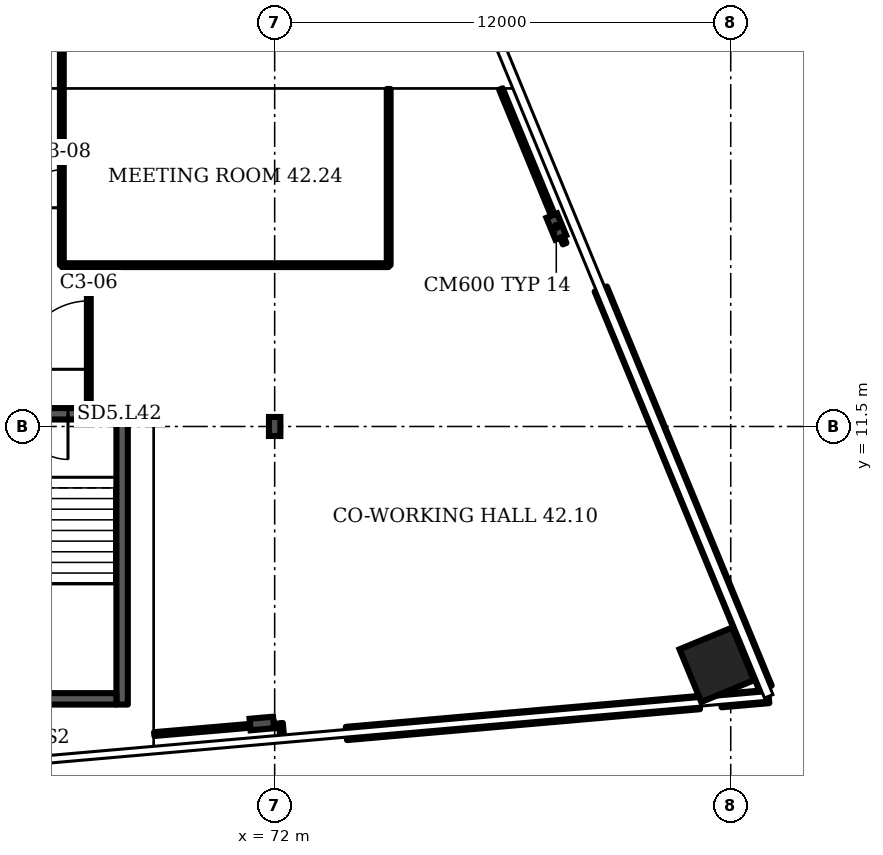
"""IFC4 building model, lengths in metres.
Left out: names, types, materials, properties, quantities, classifications, styles, units other than length and angle.
Written with IfcOpenShell. Run it as: python <this file> out.ifc"""

import sys

from ifc_helpers import new_model, si_unit, direction, frame, frame_2d, origin, origin_2d, place, context, subcontext, project, spatial, rectangle, i_section, extrude, element, fill, save


model = new_model("IFC4")
c1 = context("Model", 3, precision=1e-05, world=origin(), true_north=direction((0.0, 1.0)))
c2 = subcontext(c1, "Body", "Model", "MODEL_VIEW")
j1 = project(units=[si_unit("LENGTHUNIT", "METRE"), si_unit("PLANEANGLEUNIT", "RADIAN")], contexts=[c1])
p1 = place(None, origin())
s1 = spatial("IfcSite", under=j1, at=p1, CompositionType="ELEMENT")
p2 = place(p1, origin())
s2 = spatial("IfcBuilding", under=s1, at=p2, CompositionType="ELEMENT")
p3 = place(p2, frame((0.0, 0.0, 173.5)))
s3 = spatial("IfcBuildingStorey", under=s2, at=p3, CompositionType="ELEMENT", Elevation=173.5)
p4 = place(p3, frame((83.633, 5.231, 0.0), z_axis=(0.0, 0.0, 1.0), x_axis=(-0.381602, 0.924325, 0.0)))
e1 = element("IfcColumn", 1, at=p4, inside=s3, PredefinedType="COLUMN", context=c2, shape_type="SweptSolid", body=[
    extrude(rectangle(XDim=1.5, YDim=1.5, at=origin_2d()), origin(), (0.0, 0.0, 1.0), 3.6),
])
for number, where, z_axis, x_axis in (
    (2, (71.662, 3.685, 0.0), (0.0, 0.0, 1.0), (0.087, -0.996, 0.0)),
    (3, (79.41, 16.762, 0.0), (0.0, 0.0, 1.0), (0.924, 0.382, 0.0)),
):
    element("IfcColumn", number, at=place(p3, frame(where, z_axis=z_axis, x_axis=x_axis)), inside=s3, PredefinedType="COLUMN", context=c2, shape_type="SweptSolid", body=[
        extrude(i_section(OverallWidth=0.305, OverallDepth=0.62, WebThickness=0.021, FlangeThickness=0.04, FilletRadius=0.027, at=origin_2d()), origin(), (0.0, 0.0, 1.0), 3.6),
    ])
p5 = place(p3, frame((72.0, 11.5, 0.0), z_axis=(0.0, 0.0, 1.0), x_axis=(1.0, 0.0, 0.0)))
e4 = element("IfcColumn", 4, at=p5, inside=s3, PredefinedType="COLUMN", context=c2, shape_type="SweptSolid", body=[
    extrude(i_section(OverallWidth=0.3, OverallDepth=0.5, WebThickness=0.014, FlangeThickness=0.028, FilletRadius=0.027, at=origin_2d()), origin(), (0.0, 0.0, 1.0), 3.6),
])
p6 = place(p3, frame((73.887, 3.423, 0.0), z_axis=(0.0, 0.0, 1.0), x_axis=(0.996197, 0.087145, 0.0)))
e5 = element("IfcWall", 5, at=p6, inside=s3, PredefinedType="SOLIDWALL", context=c2, shape_type="SweptSolid", body=[
    extrude(rectangle(XDim=9.323, YDim=0.35, at=frame_2d((4.662, 0.0))), origin(), (0.0, 0.0, 1.0), 1.0),
])
p7 = place(p3, frame((83.745, 4.285, 0.0), z_axis=(0.0, 0.0, 1.0), x_axis=(0.996198, 0.087148, 0.0)))
e6 = element("IfcWall", 6, at=p7, inside=s3, PredefinedType="SOLIDWALL", context=c2, shape_type="SweptSolid", body=[
    extrude(rectangle(XDim=1.261, YDim=0.35, at=frame_2d((0.63, 0.0))), origin(), (0.0, 0.0, 1.0), 1.0),
])
p8 = place(p3, frame((84.916, 4.616, 0.0), z_axis=(0.0, 0.0, 1.0), x_axis=(-0.381598, 0.924328, 0.0)))
e7 = element("IfcWall", 7, at=p8, inside=s3, PredefinedType="SOLIDWALL", context=c2, shape_type="SweptSolid", body=[
    extrude(rectangle(XDim=11.361, YDim=0.35, at=frame_2d((5.68, 0.0))), origin(), (0.0, 0.0, 1.0), 1.0),
])
p9 = place(p3, frame((63.786, 11.834, 0.0), z_axis=(0.0, 0.0, 1.0), x_axis=(1.0, 0.0, 0.0)))
e8 = element("IfcWall", 8, at=p9, inside=s3, PredefinedType="SHEAR", context=c2, shape_type="SweptSolid", body=[
    extrude(rectangle(XDim=4.35, YDim=0.3, at=frame_2d((2.175, 0.0))), origin(), (0.0, 0.0, 1.0), 3.2),
])
p10 = place(p9, frame((1.575, 0.0, 0.0)))
e9 = element("IfcOpeningElement", 9, at=p10, cuts=e8, PredefinedType="OPENING", context=c2, shape_type="SweptSolid", body=[
    extrude(rectangle(XDim=1.2, YDim=2.1, at=frame_2d((0.6, 1.05))), frame((0.0, 0.16, 0.0), z_axis=(0.0, -1.0, 0.0), x_axis=(1.0, 0.0, 0.0)), (0.0, 0.0, 1.0), 0.32),
])
p11 = place(p3, frame((66.4, 15.745, 0.0), z_axis=(0.0, 0.0, 1.0), x_axis=(0.0, 1.0, 0.0)))
e10 = element("IfcWall", 10, at=p11, inside=s3, PredefinedType="PARTITIONING", context=c2, shape_type="SweptSolid", body=[
    extrude(rectangle(XDim=5.98, YDim=0.1, at=frame_2d((2.99, 0.0))), origin(), (0.0, 0.0, 1.0), 3.2),
])
p12 = place(p11, frame((1.51, 0.0, 0.0)))
e11 = element("IfcOpeningElement", 11, at=p12, cuts=e10, PredefinedType="OPENING", context=c2, shape_type="SweptSolid", body=[
    extrude(rectangle(XDim=1.0, YDim=2.1, at=frame_2d((0.5, 1.05))), frame((0.0, 0.06, 0.0), z_axis=(0.0, -1.0, 0.0), x_axis=(1.0, 0.0, 0.0)), (0.0, 0.0, 1.0), 0.12),
])
p13 = place(p3, frame((66.4, 15.745, 0.0), z_axis=(0.0, 0.0, 1.0), x_axis=(1.0, 0.0, 0.0)))
e12 = element("IfcWall", 12, at=p13, inside=s3, PredefinedType="PARTITIONING", context=c2, shape_type="SweptSolid", body=[
    extrude(rectangle(XDim=8.6, YDim=0.1, at=frame_2d((4.3, 0.0))), origin(), (0.0, 0.0, 1.0), 3.2),
])
p14 = place(p3, frame((67.11, 12.004, 0.0), z_axis=(0.0, 0.0, 1.0), x_axis=(0.0, 1.0, 0.0)))
e13 = element("IfcWall", 13, at=p14, inside=s3, PredefinedType="PARTITIONING", context=c2, shape_type="SweptSolid", body=[
    extrude(rectangle(XDim=3.741, YDim=0.1, at=frame_2d((1.871, 0.0))), origin(), (0.0, 0.0, 1.0), 3.2),
])
p15 = place(p14, frame((1.001, 0.0, 0.0)))
e14 = element("IfcOpeningElement", 14, at=p15, cuts=e13, PredefinedType="OPENING", context=c2, shape_type="SweptSolid", body=[
    extrude(rectangle(XDim=1.8, YDim=2.1, at=frame_2d((0.9, 1.05))), frame((0.0, 0.06, 0.0), z_axis=(0.0, -1.0, 0.0), x_axis=(1.0, 0.0, 0.0)), (0.0, 0.0, 1.0), 0.12),
])
p16 = place(p3, frame((68.831, 3.407, 0.0), z_axis=(0.0, 0.0, 1.0), x_axis=(0.996308, 0.085898, 0.0)))
e15 = element("IfcWall", 15, at=p16, inside=s3, PredefinedType="PARTITIONING", context=c2, shape_type="SweptSolid", body=[
    extrude(rectangle(XDim=3.18, YDim=0.1, at=frame_2d((1.59, 0.0))), origin(), (0.0, 0.0, 1.0), 2.58),
])
p17 = place(p3, frame((72.198, 3.3, 0.0), z_axis=(0.0, 0.0, 1.0), x_axis=(-0.083759, 0.996486, 0.0)))
e16 = element("IfcWall", 16, at=p17, inside=s3, PredefinedType="PARTITIONING", context=c2, shape_type="SweptSolid", body=[
    extrude(rectangle(XDim=0.396, YDim=0.1, at=frame_2d((0.198, 0.0))), origin(), (0.0, 0.0, 1.0), 3.2),
])
p18 = place(p3, frame((75.0, 15.745, 0.0), z_axis=(0.0, 0.0, 1.0), x_axis=(0.0, 1.0, 0.0)))
e17 = element("IfcWall", 17, at=p18, inside=s3, PredefinedType="PARTITIONING", context=c2, shape_type="SweptSolid", body=[
    extrude(rectangle(XDim=4.635, YDim=0.1, at=frame_2d((2.317, 0.0))), origin(), (0.0, 0.0, 1.0), 3.2),
])
p19 = place(p3, frame((79.63, 16.31, 0.0), z_axis=(0.0, 0.0, 1.0), x_axis=(-0.380933, 0.9246, 0.0)))
e18 = element("IfcWall", 18, at=p19, inside=s3, PredefinedType="PARTITIONING", context=c2, shape_type="SweptSolid", body=[
    extrude(rectangle(XDim=4.402, YDim=0.1, at=frame_2d((2.201, 0.0))), origin(), (0.0, 0.0, 1.0), 2.58),
])
p20 = place(p3, frame((67.986, 4.184, 0.0), z_axis=(0.0, 0.0, 1.0), x_axis=(0.0, 1.0, 0.0)))
e19 = element("IfcWall", 19, at=p20, inside=s3, PredefinedType="SHEAR", context=c2, shape_type="SweptSolid", body=[
    extrude(rectangle(XDim=7.5, YDim=0.3, at=frame_2d((3.75, 0.0))), origin(), (0.0, 0.0, 1.0), 3.2),
])
p21 = place(p3, frame((64.086, 4.334, 0.0), z_axis=(0.0, 0.0, 1.0), x_axis=(1.0, 0.0, 0.0)))
e20 = element("IfcWall", 20, at=p21, inside=s3, PredefinedType="SHEAR", context=c2, shape_type="SweptSolid", body=[
    extrude(rectangle(XDim=3.75, YDim=0.3, at=frame_2d((1.875, 0.0))), origin(), (0.0, 0.0, 1.0), 3.2),
])
p22 = place(p10, origin())
e21 = element("IfcDoor", 21, at=p22, inside=s3, OperationType="SINGLE_SWING_RIGHT", PredefinedType="DOOR", context=c2, shape_type="SweptSolid", body=[
    extrude(rectangle(XDim=1.2, YDim=2.1, at=frame_2d((0.6, 1.05))), frame((0.0, 0.025, 0.0), z_axis=(0.0, -1.0, 0.0), x_axis=(1.0, 0.0, 0.0)), (0.0, 0.0, 1.0), 0.05),
])
fill(e9, e21)
p23 = place(p15, origin())
e22 = element("IfcDoor", 22, at=p23, inside=s3, OperationType="DOUBLE_DOOR_SINGLE_SWING", PredefinedType="DOOR", context=c2, shape_type="SweptSolid", body=[
    extrude(rectangle(XDim=1.8, YDim=2.1, at=frame_2d((0.9, 1.05))), frame((0.0, 0.025, 0.0), z_axis=(0.0, -1.0, 0.0), x_axis=(1.0, 0.0, 0.0)), (0.0, 0.0, 1.0), 0.05),
])
fill(e14, e22)
p24 = place(p12, origin())
e23 = element("IfcDoor", 23, at=p24, inside=s3, OperationType="SINGLE_SWING_LEFT", PredefinedType="DOOR", context=c2, shape_type="SweptSolid", body=[
    extrude(rectangle(XDim=1.0, YDim=2.1, at=frame_2d((0.5, 1.05))), frame((0.0, 0.025, 0.0), z_axis=(0.0, -1.0, 0.0), x_axis=(1.0, 0.0, 0.0)), (0.0, 0.0, 1.0), 0.05),
])
fill(e11, e23)
save(model, sys.argv[1])
